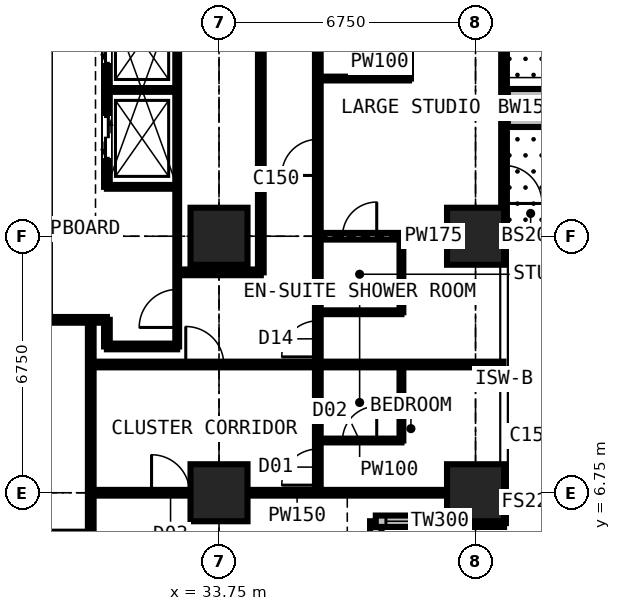
"""IFC4 building model, lengths in metres.
Left out: names, types, materials, properties, quantities, classifications, styles, units other than length and angle.
Written with IfcOpenShell. Run it as: python <this file> out.ifc"""

import sys

from ifc_helpers import new_model, si_unit, direction, frame, frame_2d, origin, origin_2d, place, context, subcontext, project, spatial, rectangle, extrude, element, fill, save


model = new_model("IFC4")
c1 = context("Model", 3, precision=1e-05, world=origin(), true_north=direction((0.0, 1.0)))
c2 = subcontext(c1, "Body", "Model", "MODEL_VIEW")
j1 = project(units=[si_unit("LENGTHUNIT", "METRE"), si_unit("PLANEANGLEUNIT", "RADIAN")], contexts=[c1])
p1 = place(None, origin())
s1 = spatial("IfcSite", under=j1, at=p1, CompositionType="ELEMENT")
p2 = place(p1, origin())
s2 = spatial("IfcBuilding", under=s1, at=p2, CompositionType="ELEMENT")
p3 = place(p2, frame((0.0, 0.0, 123.3)))
s3 = spatial("IfcBuildingStorey", under=s2, at=p3, CompositionType="ELEMENT", Elevation=123.3)
for number, where, z_axis, x_axis in (
    (1, (33.75, 6.75, 0.0), (0.0, 0.0, 1.0), (1.0, 0.0, 0.0)),
    (2, (33.75, 13.5, 0.0), (0.0, 0.0, 1.0), (1.0, 0.0, 0.0)),
    (3, (40.5, 6.75, 0.0), (0.0, 0.0, 1.0), (1.0, 0.0, 0.0)),
    (4, (40.5, 13.5, 0.0), (0.0, 0.0, 1.0), (1.0, 0.0, 0.0)),
):
    element("IfcColumn", number, at=place(p3, frame(where, z_axis=z_axis, x_axis=x_axis)), inside=s3, PredefinedType="COLUMN", context=c2, shape_type="SweptSolid", body=[
        extrude(rectangle(XDim=1.5, YDim=1.5, at=origin_2d()), origin(), (0.0, 0.0, 1.0), 3.6),
    ])
p4 = place(p3, frame((41.25, 20.25, 0.0), z_axis=(0.0, 0.0, 1.0), x_axis=(0.0, -1.0, 0.0)))
e5 = element("IfcWall", 5, at=p4, inside=s3, PredefinedType="SOLIDWALL", context=c2, shape_type="SweptSolid", body=[
    extrude(rectangle(XDim=6.75, YDim=0.15, at=frame_2d((3.375, 0.0))), origin(), (0.0, 0.0, 1.0), 3.375),
])
p5 = place(p4, frame((0.863, 0.0, 0.0)))
e6 = element("IfcOpeningElement", 6, at=p5, cuts=e5, PredefinedType="OPENING", context=c2, shape_type="SweptSolid", body=[
    extrude(rectangle(XDim=1.0, YDim=2.2, at=frame_2d((0.5, 1.1))), frame((0.0, 0.085, 0.0), z_axis=(0.0, -1.0, 0.0), x_axis=(1.0, 0.0, 0.0)), (0.0, 0.0, 1.0), 0.17),
])
p6 = place(p4, frame((1.975, 0.0, 0.9)))
e7 = element("IfcOpeningElement", 7, at=p6, cuts=e5, PredefinedType="OPENING", context=c2, shape_type="SweptSolid", body=[
    extrude(rectangle(XDim=1.2, YDim=1.8, at=frame_2d((0.6, 0.9))), frame((0.0, 0.085, 0.0), z_axis=(0.0, -1.0, 0.0), x_axis=(1.0, 0.0, 0.0)), (0.0, 0.0, 1.0), 0.17),
])
p7 = place(p4, frame((4.887, 0.0, 0.0)))
e8 = element("IfcOpeningElement", 8, at=p7, cuts=e5, PredefinedType="OPENING", context=c2, shape_type="SweptSolid", body=[
    extrude(rectangle(XDim=1.0, YDim=2.2, at=frame_2d((0.5, 1.1))), frame((0.0, 0.085, 0.0), z_axis=(0.0, -1.0, 0.0), x_axis=(1.0, 0.0, 0.0)), (0.0, 0.0, 1.0), 0.17),
])
p8 = place(p4, frame((3.575, 0.0, 0.9)))
e9 = element("IfcOpeningElement", 9, at=p8, cuts=e5, PredefinedType="OPENING", context=c2, shape_type="SweptSolid", body=[
    extrude(rectangle(XDim=1.2, YDim=1.8, at=frame_2d((0.6, 0.9))), frame((0.0, 0.085, 0.0), z_axis=(0.0, -1.0, 0.0), x_axis=(1.0, 0.0, 0.0)), (0.0, 0.0, 1.0), 0.17),
])
p9 = place(p3, frame((37.875, 2.625, 0.0), z_axis=(0.0, 0.0, 1.0), x_axis=(0.0, 1.0, 0.0)))
e10 = element("IfcWall", 10, at=p9, inside=s3, PredefinedType="SOLIDWALL", context=c2, shape_type="SweptSolid", body=[
    extrude(rectangle(XDim=3.375, YDim=0.3, at=frame_2d((1.688, 0.0))), origin(), (0.0, 0.0, 1.0), 3.375),
])
p10 = place(p9, frame((0.788, 0.0, 0.6)))
e11 = element("IfcOpeningElement", 11, at=p10, cuts=e10, PredefinedType="OPENING", context=c2, shape_type="SweptSolid", body=[
    extrude(rectangle(XDim=1.8, YDim=2.1, at=frame_2d((0.9, 1.05))), frame((0.0, 0.16, 0.0), z_axis=(0.0, -1.0, 0.0), x_axis=(1.0, 0.0, 0.0)), (0.0, 0.0, 1.0), 0.32),
])
p11 = place(p3, frame((37.875, 6.0, 0.0), z_axis=(0.0, 0.0, 1.0), x_axis=(1.0, 0.0, 0.0)))
e12 = element("IfcWall", 12, at=p11, inside=s3, PredefinedType="SOLIDWALL", context=c2, shape_type="SweptSolid", body=[
    extrude(rectangle(XDim=3.375, YDim=0.3, at=frame_2d((1.688, 0.0))), origin(), (0.0, 0.0, 1.0), 3.375),
])
p12 = place(p11, frame((0.268, 0.0, 0.9)))
e13 = element("IfcOpeningElement", 13, at=p12, cuts=e12, PredefinedType="OPENING", context=c2, shape_type="SweptSolid", body=[
    extrude(rectangle(XDim=1.5, YDim=1.8, at=frame_2d((0.75, 0.9))), frame((0.0, 0.16, 0.0), z_axis=(0.0, -1.0, 0.0), x_axis=(1.0, 0.0, 0.0)), (0.0, 0.0, 1.0), 0.32),
])
p13 = place(p3, frame((41.35, 16.875, 0.0), z_axis=(0.0, 0.0, 1.0), x_axis=(1.0, 0.0, 0.0)))
e14 = element("IfcWall", 14, at=p13, inside=s3, PredefinedType="USERDEFINED", context=c2, shape_type="SweptSolid", body=[
    extrude(rectangle(XDim=2.2, YDim=1.0, at=frame_2d((1.1, 0.0))), origin(), (0.0, 0.0, 1.0), 0.9),
])
p14 = place(p3, frame((10.125, 11.3, 0.0), z_axis=(0.0, 0.0, 1.0), x_axis=(1.0, 0.0, 0.0)))
e15 = element("IfcWall", 15, at=p14, inside=s3, PredefinedType="PARTITIONING", context=c2, shape_type="SweptSolid", body=[
    extrude(rectangle(XDim=20.675, YDim=0.15, at=frame_2d((10.337, 0.0))), origin(), (0.0, 0.0, 1.0), 3.375),
])
p15 = place(p14, frame((8.375, 0.0, 0.0)))
e16 = element("IfcOpeningElement", 16, at=p15, cuts=e15, PredefinedType="OPENING", context=c2, shape_type="SweptSolid", body=[
    extrude(rectangle(XDim=1.0, YDim=2.2, at=frame_2d((0.5, 1.1))), frame((0.0, 0.085, 0.0), z_axis=(0.0, -1.0, 0.0), x_axis=(1.0, 0.0, 0.0)), (0.0, 0.0, 1.0), 0.17),
])
p16 = place(p14, frame((10.975, 0.0, 0.0)))
e17 = element("IfcOpeningElement", 17, at=p16, cuts=e15, PredefinedType="OPENING", context=c2, shape_type="SweptSolid", body=[
    extrude(rectangle(XDim=1.0, YDim=2.2, at=frame_2d((0.5, 1.1))), frame((0.0, 0.085, 0.0), z_axis=(0.0, -1.0, 0.0), x_axis=(1.0, 0.0, 0.0)), (0.0, 0.0, 1.0), 0.17),
])
p17 = place(p14, frame((3.925, 0.0, 0.0)))
e18 = element("IfcOpeningElement", 18, at=p17, cuts=e15, PredefinedType="OPENING", context=c2, shape_type="SweptSolid", body=[
    extrude(rectangle(XDim=0.95, YDim=2.2, at=frame_2d((0.475, 1.1))), frame((0.0, 0.085, 0.0), z_axis=(0.0, -1.0, 0.0), x_axis=(1.0, 0.0, 0.0)), (0.0, 0.0, 1.0), 0.17),
])
p18 = place(p3, frame((30.375, -0.734, 0.0), z_axis=(0.0, 0.0, 1.0), x_axis=(0.0, 1.0, 0.0)))
e19 = element("IfcWall", 19, at=p18, inside=s3, PredefinedType="PARTITIONING", context=c2, shape_type="SweptSolid", body=[
    extrude(rectangle(XDim=12.034, YDim=0.15, at=frame_2d((6.017, 0.0))), origin(), (0.0, 0.0, 1.0), 3.375),
])
p19 = place(p3, frame((30.375, 6.75, 0.0), z_axis=(0.0, 0.0, 1.0), x_axis=(1.0, 0.0, 0.0)))
e20 = element("IfcWall", 20, at=p19, inside=s3, PredefinedType="PARTITIONING", context=c2, shape_type="SweptSolid", body=[
    extrude(rectangle(XDim=10.859, YDim=0.15, at=frame_2d((5.429, 0.0))), origin(), (0.0, 0.0, 1.0), 2.877),
])
p20 = place(p19, frame((1.6, 0.0, 0.0)))
e21 = element("IfcOpeningElement", 21, at=p20, cuts=e20, PredefinedType="OPENING", context=c2, shape_type="SweptSolid", body=[
    extrude(rectangle(XDim=1.0, YDim=2.2, at=frame_2d((0.5, 1.1))), frame((0.0, 0.085, 0.0), z_axis=(0.0, -1.0, 0.0), x_axis=(1.0, 0.0, 0.0)), (0.0, 0.0, 1.0), 0.17),
])
p21 = place(p3, frame((30.375, 10.125, 0.0), z_axis=(0.0, 0.0, 1.0), x_axis=(1.0, 0.0, 0.0)))
e22 = element("IfcWall", 22, at=p21, inside=s3, PredefinedType="PARTITIONING", context=c2, shape_type="SweptSolid", body=[
    extrude(rectangle(XDim=10.859, YDim=0.15, at=frame_2d((5.429, 0.0))), origin(), (0.0, 0.0, 1.0), 3.375),
])
p22 = place(p21, frame((2.5, 0.0, 0.0)))
e23 = element("IfcOpeningElement", 23, at=p22, cuts=e22, PredefinedType="OPENING", context=c2, shape_type="SweptSolid", body=[
    extrude(rectangle(XDim=1.0, YDim=2.2, at=frame_2d((0.5, 1.1))), frame((0.0, 0.085, 0.0), z_axis=(0.0, -1.0, 0.0), x_axis=(1.0, 0.0, 0.0)), (0.0, 0.0, 1.0), 0.17),
])
p23 = place(p3, frame((30.8, 10.6, 0.0), z_axis=(0.0, 0.0, 1.0), x_axis=(0.0, 1.0, 0.0)))
e24 = element("IfcWall", 24, at=p23, inside=s3, PredefinedType="PARTITIONING", context=c2, shape_type="SweptSolid", body=[
    extrude(rectangle(XDim=0.7, YDim=0.15, at=frame_2d((0.35, 0.0))), origin(), (0.0, 0.0, 1.0), 3.375),
])
p24 = place(p3, frame((30.8, 10.6, 0.0), z_axis=(0.0, 0.0, 1.0), x_axis=(1.0, 0.0, 0.0)))
e25 = element("IfcWall", 25, at=p24, inside=s3, PredefinedType="PARTITIONING", context=c2, shape_type="SweptSolid", body=[
    extrude(rectangle(XDim=1.85, YDim=0.15, at=frame_2d((0.925, 0.0))), origin(), (0.0, 0.0, 1.0), 3.375),
])
p25 = place(p3, frame((30.8, 14.8, 0.0), z_axis=(0.0, 0.0, 1.0), x_axis=(0.0, 1.0, 0.0)))
e26 = element("IfcWall", 26, at=p25, inside=s3, PredefinedType="PARTITIONING", context=c2, shape_type="SweptSolid", body=[
    extrude(rectangle(XDim=10.9, YDim=0.15, at=frame_2d((5.45, 0.0))), origin(), (0.0, 0.0, 1.0), 3.375),
])
p26 = place(p25, frame((0.75, 0.0, 0.0)))
e27 = element("IfcOpeningElement", 27, at=p26, cuts=e26, PredefinedType="OPENING", context=c2, shape_type="SweptSolid", body=[
    extrude(rectangle(XDim=1.1, YDim=2.2, at=frame_2d((0.55, 1.1))), frame((0.0, 0.085, 0.0), z_axis=(0.0, -1.0, 0.0), x_axis=(1.0, 0.0, 0.0)), (0.0, 0.0, 1.0), 0.17),
])
p27 = place(p25, frame((3.25, 0.0, 0.0)))
e28 = element("IfcOpeningElement", 28, at=p27, cuts=e26, PredefinedType="OPENING", context=c2, shape_type="SweptSolid", body=[
    extrude(rectangle(XDim=1.1, YDim=2.2, at=frame_2d((0.55, 1.1))), frame((0.0, 0.085, 0.0), z_axis=(0.0, -1.0, 0.0), x_axis=(1.0, 0.0, 0.0)), (0.0, 0.0, 1.0), 0.17),
])
p28 = place(p25, frame((6.5, 0.0, 0.0)))
e29 = element("IfcOpeningElement", 29, at=p28, cuts=e26, PredefinedType="OPENING", context=c2, shape_type="SweptSolid", body=[
    extrude(rectangle(XDim=1.1, YDim=2.2, at=frame_2d((0.55, 1.1))), frame((0.0, 0.085, 0.0), z_axis=(0.0, -1.0, 0.0), x_axis=(1.0, 0.0, 0.0)), (0.0, 0.0, 1.0), 0.17),
])
p29 = place(p25, frame((9.05, 0.0, 0.0)))
e30 = element("IfcOpeningElement", 30, at=p29, cuts=e26, PredefinedType="OPENING", context=c2, shape_type="SweptSolid", body=[
    extrude(rectangle(XDim=1.1, YDim=2.2, at=frame_2d((0.55, 1.1))), frame((0.0, 0.085, 0.0), z_axis=(0.0, -1.0, 0.0), x_axis=(1.0, 0.0, 0.0)), (0.0, 0.0, 1.0), 0.17),
])
for number, where, z_axis, x_axis in (
    (31, (30.8, 14.8, 0.0), (0.0, 0.0, 1.0), (1.0, 0.0, 0.0)),
    (32, (30.8, 17.35, 0.0), (0.0, 0.0, 1.0), (1.0, 0.0, 0.0)),
):
    element("IfcWall", number, at=place(p3, frame(where, z_axis=z_axis, x_axis=x_axis)), inside=s3, PredefinedType="SHEAR", context=c2, shape_type="SweptSolid", body=[
        extrude(rectangle(XDim=1.85, YDim=0.1, at=frame_2d((0.925, 0.0))), origin(), (0.0, 0.0, 1.0), 3.375),
    ])
p30 = place(p3, frame((32.65, 10.6, 0.0), z_axis=(0.0, 0.0, 1.0), x_axis=(0.0, 1.0, 0.0)))
e33 = element("IfcWall", 33, at=p30, inside=s3, PredefinedType="SHEAR", context=c2, shape_type="SweptSolid", body=[
    extrude(rectangle(XDim=9.3, YDim=0.1, at=frame_2d((4.65, 0.0))), origin(), (0.0, 0.0, 1.0), 3.375),
])
p31 = place(p30, frame((0.5, 0.0, 0.0)))
e34 = element("IfcOpeningElement", 34, at=p31, cuts=e33, PredefinedType="OPENING", context=c2, shape_type="SweptSolid", body=[
    extrude(rectangle(XDim=1.0, YDim=2.2, at=frame_2d((0.5, 1.1))), frame((0.0, 0.06, 0.0), z_axis=(0.0, -1.0, 0.0), x_axis=(1.0, 0.0, 0.0)), (0.0, 0.0, 1.0), 0.12),
])
p32 = place(p3, frame((32.65, 12.55, 0.0), z_axis=(0.0, 0.0, 1.0), x_axis=(1.0, 0.0, 0.0)))
e35 = element("IfcWall", 35, at=p32, inside=s3, PredefinedType="PARTITIONING", context=c2, shape_type="SweptSolid", body=[
    extrude(rectangle(XDim=2.2, YDim=0.15, at=frame_2d((1.1, 0.0))), origin(), (0.0, 0.0, 1.0), 3.375),
])
p33 = place(p3, frame((34.85, 12.55, 0.0), z_axis=(0.0, 0.0, 1.0), x_axis=(0.0, 1.0, 0.0)))
e36 = element("IfcWall", 36, at=p33, inside=s3, PredefinedType="PARTITIONING", context=c2, shape_type="SweptSolid", body=[
    extrude(rectangle(XDim=17.825, YDim=0.15, at=frame_2d((8.913, 0.0))), origin(), (0.0, 0.0, 1.0), 3.375),
])
p34 = place(p33, frame((8.5, 0.0, 0.0)))
e37 = element("IfcOpeningElement", 37, at=p34, cuts=e36, PredefinedType="OPENING", context=c2, shape_type="SweptSolid", body=[
    extrude(rectangle(XDim=0.95, YDim=2.2, at=frame_2d((0.475, 1.1))), frame((0.0, 0.085, 0.0), z_axis=(0.0, -1.0, 0.0), x_axis=(1.0, 0.0, 0.0)), (0.0, 0.0, 1.0), 0.17),
])
p35 = place(p3, frame((36.35, 6.75, 0.0), z_axis=(0.0, 0.0, 1.0), x_axis=(0.0, 1.0, 0.0)))
e38 = element("IfcWall", 38, at=p35, inside=s3, PredefinedType="PARTITIONING", context=c2, shape_type="SweptSolid", body=[
    extrude(rectangle(XDim=20.25, YDim=0.15, at=frame_2d((10.125, 0.0))), origin(), (0.0, 0.0, 1.0), 3.375),
])
p36 = place(p35, frame((0.2, 0.0, 0.0)))
e39 = element("IfcOpeningElement", 39, at=p36, cuts=e38, PredefinedType="OPENING", context=c2, shape_type="SweptSolid", body=[
    extrude(rectangle(XDim=0.95, YDim=2.2, at=frame_2d((0.475, 1.1))), frame((0.0, 0.085, 0.0), z_axis=(0.0, -1.0, 0.0), x_axis=(1.0, 0.0, 0.0)), (0.0, 0.0, 1.0), 0.17),
])
p37 = place(p35, frame((15.1, 0.0, 0.0)))
e40 = element("IfcOpeningElement", 40, at=p37, cuts=e38, PredefinedType="OPENING", context=c2, shape_type="SweptSolid", body=[
    extrude(rectangle(XDim=0.95, YDim=2.2, at=frame_2d((0.475, 1.1))), frame((0.0, 0.085, 0.0), z_axis=(0.0, -1.0, 0.0), x_axis=(1.0, 0.0, 0.0)), (0.0, 0.0, 1.0), 0.17),
])
p38 = place(p35, frame((8.35, 0.0, 0.0)))
e41 = element("IfcOpeningElement", 41, at=p38, cuts=e38, PredefinedType="OPENING", context=c2, shape_type="SweptSolid", body=[
    extrude(rectangle(XDim=0.95, YDim=2.2, at=frame_2d((0.475, 1.1))), frame((0.0, 0.085, 0.0), z_axis=(0.0, -1.0, 0.0), x_axis=(1.0, 0.0, 0.0)), (0.0, 0.0, 1.0), 0.17),
])
p39 = place(p35, frame((3.575, 0.0, 0.0)))
e42 = element("IfcOpeningElement", 42, at=p39, cuts=e38, PredefinedType="OPENING", context=c2, shape_type="SweptSolid", body=[
    extrude(rectangle(XDim=0.95, YDim=2.2, at=frame_2d((0.475, 1.1))), frame((0.0, 0.085, 0.0), z_axis=(0.0, -1.0, 0.0), x_axis=(1.0, 0.0, 0.0)), (0.0, 0.0, 1.0), 0.17),
])
p40 = place(p3, frame((36.35, 8.125, 0.0), z_axis=(0.0, 0.0, 1.0), x_axis=(1.0, 0.0, 0.0)))
e43 = element("IfcWall", 43, at=p40, inside=s3, PredefinedType="PARTITIONING", context=c2, shape_type="SweptSolid", body=[
    extrude(rectangle(XDim=2.2, YDim=0.1, at=frame_2d((1.1, 0.0))), origin(), (0.0, 0.0, 1.0), 3.375),
])
p41 = place(p40, frame((0.65, 0.0, 0.0)))
e44 = element("IfcOpeningElement", 44, at=p41, cuts=e43, PredefinedType="OPENING", context=c2, shape_type="SweptSolid", body=[
    extrude(rectangle(XDim=0.9, YDim=2.2, at=frame_2d((0.45, 1.1))), frame((0.0, 0.06, 0.0), z_axis=(0.0, -1.0, 0.0), x_axis=(1.0, 0.0, 0.0)), (0.0, 0.0, 1.0), 0.12),
])
p42 = place(p3, frame((36.35, 11.5, 0.0), z_axis=(0.0, 0.0, 1.0), x_axis=(1.0, 0.0, 0.0)))
e45 = element("IfcWall", 45, at=p42, inside=s3, PredefinedType="PARTITIONING", context=c2, shape_type="SweptSolid", body=[
    extrude(rectangle(XDim=2.2, YDim=0.1, at=frame_2d((1.1, 0.0))), origin(), (0.0, 0.0, 1.0), 3.375),
])
p43 = place(p3, frame((36.35, 13.5, 0.0), z_axis=(0.0, 0.0, 1.0), x_axis=(1.0, 0.0, 0.0)))
e46 = element("IfcWall", 46, at=p43, inside=s3, PredefinedType="PARTITIONING", context=c2, shape_type="SweptSolid", body=[
    extrude(rectangle(XDim=4.884, YDim=0.175, at=frame_2d((2.442, 0.0))), origin(), (0.0, 0.0, 1.0), 2.877),
])
p44 = place(p43, frame((0.65, 0.0, 0.0)))
e47 = element("IfcOpeningElement", 47, at=p44, cuts=e46, PredefinedType="OPENING", context=c2, shape_type="SweptSolid", body=[
    extrude(rectangle(XDim=0.9, YDim=2.2, at=frame_2d((0.45, 1.1))), frame((0.0, 0.097, 0.0), z_axis=(0.0, -1.0, 0.0), x_axis=(1.0, 0.0, 0.0)), (0.0, 0.0, 1.0), 0.195),
])
p45 = place(p3, frame((36.35, 17.65, 0.0), z_axis=(0.0, 0.0, 1.0), x_axis=(1.0, 0.0, 0.0)))
e48 = element("IfcWall", 48, at=p45, inside=s3, PredefinedType="PARTITIONING", context=c2, shape_type="SweptSolid", body=[
    extrude(rectangle(XDim=2.4, YDim=0.1, at=frame_2d((1.2, 0.0))), origin(), (0.0, 0.0, 1.0), 3.375),
])
for number, where, z_axis, x_axis in (
    (49, (38.55, 8.125, 0.0), (0.0, 0.0, 1.0), (0.0, 1.0, 0.0)),
    (50, (38.55, 11.5, 0.0), (0.0, 0.0, 1.0), (0.0, 1.0, 0.0)),
):
    element("IfcWall", number, at=place(p3, frame(where, z_axis=z_axis, x_axis=x_axis)), inside=s3, PredefinedType="PARTITIONING", context=c2, shape_type="SweptSolid", body=[
        extrude(rectangle(XDim=2.0, YDim=0.1, at=frame_2d((1.0, 0.0))), origin(), (0.0, 0.0, 1.0), 3.375),
    ])
p46 = place(p3, frame((38.75, 17.65, 0.0), z_axis=(0.0, 0.0, 1.0), x_axis=(0.0, 1.0, 0.0)))
e51 = element("IfcWall", 51, at=p46, inside=s3, PredefinedType="PARTITIONING", context=c2, shape_type="SweptSolid", body=[
    extrude(rectangle(XDim=2.6, YDim=0.1, at=frame_2d((1.3, 0.0))), origin(), (0.0, 0.0, 1.0), 3.375),
])
p47 = place(p6, origin())
e52 = element("IfcWindow", 52, at=p47, inside=s3, PartitioningType="SINGLE_PANEL", PredefinedType="WINDOW", context=c2, shape_type="SweptSolid", body=[
    extrude(rectangle(XDim=1.2, YDim=1.8, at=frame_2d((0.6, 0.9))), frame((0.0, 0.03, 0.0), z_axis=(0.0, -1.0, 0.0), x_axis=(1.0, 0.0, 0.0)), (0.0, 0.0, 1.0), 0.06),
])
fill(e7, e52)
p48 = place(p7, origin())
e53 = element("IfcDoor", 53, at=p48, inside=s3, OperationType="SINGLE_SWING_RIGHT", PredefinedType="DOOR", context=c2, shape_type="SweptSolid", body=[
    extrude(rectangle(XDim=1.0, YDim=2.2, at=frame_2d((0.5, 1.1))), frame((0.0, 0.025, 0.0), z_axis=(0.0, -1.0, 0.0), x_axis=(1.0, 0.0, 0.0)), (0.0, 0.0, 1.0), 0.05),
])
fill(e8, e53)
p49 = place(p8, origin())
e54 = element("IfcWindow", 54, at=p49, inside=s3, PartitioningType="SINGLE_PANEL", PredefinedType="WINDOW", context=c2, shape_type="SweptSolid", body=[
    extrude(rectangle(XDim=1.2, YDim=1.8, at=frame_2d((0.6, 0.9))), frame((0.0, 0.03, 0.0), z_axis=(0.0, -1.0, 0.0), x_axis=(1.0, 0.0, 0.0)), (0.0, 0.0, 1.0), 0.06),
])
fill(e9, e54)
p50 = place(p12, origin())
e55 = element("IfcWindow", 55, at=p50, inside=s3, PartitioningType="SINGLE_PANEL", PredefinedType="WINDOW", context=c2, shape_type="SweptSolid", body=[
    extrude(rectangle(XDim=1.5, YDim=1.8, at=frame_2d((0.75, 0.9))), frame((0.0, 0.03, 0.0), z_axis=(0.0, -1.0, 0.0), x_axis=(1.0, 0.0, 0.0)), (0.0, 0.0, 1.0), 0.06),
])
fill(e13, e55)
p51 = place(p20, origin())
e56 = element("IfcDoor", 56, at=p51, inside=s3, OperationType="SINGLE_SWING_LEFT", PredefinedType="DOOR", context=c2, shape_type="SweptSolid", body=[
    extrude(rectangle(XDim=1.0, YDim=2.2, at=frame_2d((0.5, 1.1))), frame((0.0, 0.025, 0.0), z_axis=(0.0, -1.0, 0.0), x_axis=(1.0, 0.0, 0.0)), (0.0, 0.0, 1.0), 0.05),
])
fill(e21, e56)
p52 = place(p36, origin())
e57 = element("IfcDoor", 57, at=p52, inside=s3, OperationType="SINGLE_SWING_LEFT", PredefinedType="DOOR", context=c2, shape_type="SweptSolid", body=[
    extrude(rectangle(XDim=0.95, YDim=2.2, at=frame_2d((0.475, 1.1))), frame((0.0, 0.025, 0.0), z_axis=(0.0, -1.0, 0.0), x_axis=(1.0, 0.0, 0.0)), (0.0, 0.0, 1.0), 0.05),
])
fill(e39, e57)
p53 = place(p41, origin())
e58 = element("IfcDoor", 58, at=p53, inside=s3, OperationType="SINGLE_SWING_RIGHT", PredefinedType="DOOR", context=c2, shape_type="SweptSolid", body=[
    extrude(rectangle(XDim=0.9, YDim=2.2, at=frame_2d((0.45, 1.1))), frame((0.0, 0.025, 0.0), z_axis=(0.0, -1.0, 0.0), x_axis=(1.0, 0.0, 0.0)), (0.0, 0.0, 1.0), 0.05),
])
fill(e44, e58)
p54 = place(p22, origin())
e59 = element("IfcDoor", 59, at=p54, inside=s3, OperationType="SINGLE_SWING_LEFT", PredefinedType="DOOR", context=c2, shape_type="SweptSolid", body=[
    extrude(rectangle(XDim=1.0, YDim=2.2, at=frame_2d((0.5, 1.1))), frame((0.0, 0.025, 0.0), z_axis=(0.0, -1.0, 0.0), x_axis=(1.0, 0.0, 0.0)), (0.0, 0.0, 1.0), 0.05),
])
fill(e23, e59)
p55 = place(p38, origin())
e60 = element("IfcDoor", 60, at=p55, inside=s3, OperationType="SINGLE_SWING_LEFT", PredefinedType="DOOR", context=c2, shape_type="SweptSolid", body=[
    extrude(rectangle(XDim=0.95, YDim=2.2, at=frame_2d((0.475, 1.1))), frame((0.0, 0.025, 0.0), z_axis=(0.0, -1.0, 0.0), x_axis=(1.0, 0.0, 0.0)), (0.0, 0.0, 1.0), 0.05),
])
fill(e41, e60)
p56 = place(p39, origin())
e61 = element("IfcDoor", 61, at=p56, inside=s3, OperationType="SINGLE_SWING_LEFT", PredefinedType="DOOR", context=c2, shape_type="SweptSolid", body=[
    extrude(rectangle(XDim=0.95, YDim=2.2, at=frame_2d((0.475, 1.1))), frame((0.0, 0.025, 0.0), z_axis=(0.0, -1.0, 0.0), x_axis=(1.0, 0.0, 0.0)), (0.0, 0.0, 1.0), 0.05),
])
fill(e42, e61)
p57 = place(p44, origin())
e62 = element("IfcDoor", 62, at=p57, inside=s3, OperationType="SINGLE_SWING_RIGHT", PredefinedType="DOOR", context=c2, shape_type="SweptSolid", body=[
    extrude(rectangle(XDim=0.9, YDim=2.2, at=frame_2d((0.45, 1.1))), frame((0.0, 0.025, 0.0), z_axis=(0.0, -1.0, 0.0), x_axis=(1.0, 0.0, 0.0)), (0.0, 0.0, 1.0), 0.05),
])
fill(e47, e62)
p58 = place(p31, origin())
e63 = element("IfcDoor", 63, at=p58, inside=s3, OperationType="SINGLE_SWING_LEFT", PredefinedType="DOOR", context=c2, shape_type="SweptSolid", body=[
    extrude(rectangle(XDim=1.0, YDim=2.2, at=frame_2d((0.5, 1.1))), frame((0.0, 0.025, 0.0), z_axis=(0.0, -1.0, 0.0), x_axis=(1.0, 0.0, 0.0)), (0.0, 0.0, 1.0), 0.05),
])
fill(e34, e63)
p59 = place(p26, origin())
e64 = element("IfcDoor", 64, at=p59, inside=s3, OperationType="DOUBLE_DOOR_SLIDING", PredefinedType="DOOR", context=c2, shape_type="SweptSolid", body=[
    extrude(rectangle(XDim=1.1, YDim=2.2, at=frame_2d((0.55, 1.1))), frame((0.0, 0.025, 0.0), z_axis=(0.0, -1.0, 0.0), x_axis=(1.0, 0.0, 0.0)), (0.0, 0.0, 1.0), 0.05),
])
fill(e27, e64)
p60 = place(p27, origin())
e65 = element("IfcDoor", 65, at=p60, inside=s3, OperationType="DOUBLE_DOOR_SLIDING", PredefinedType="DOOR", context=c2, shape_type="SweptSolid", body=[
    extrude(rectangle(XDim=1.1, YDim=2.2, at=frame_2d((0.55, 1.1))), frame((0.0, 0.025, 0.0), z_axis=(0.0, -1.0, 0.0), x_axis=(1.0, 0.0, 0.0)), (0.0, 0.0, 1.0), 0.05),
])
fill(e28, e65)
save(model, sys.argv[1])
